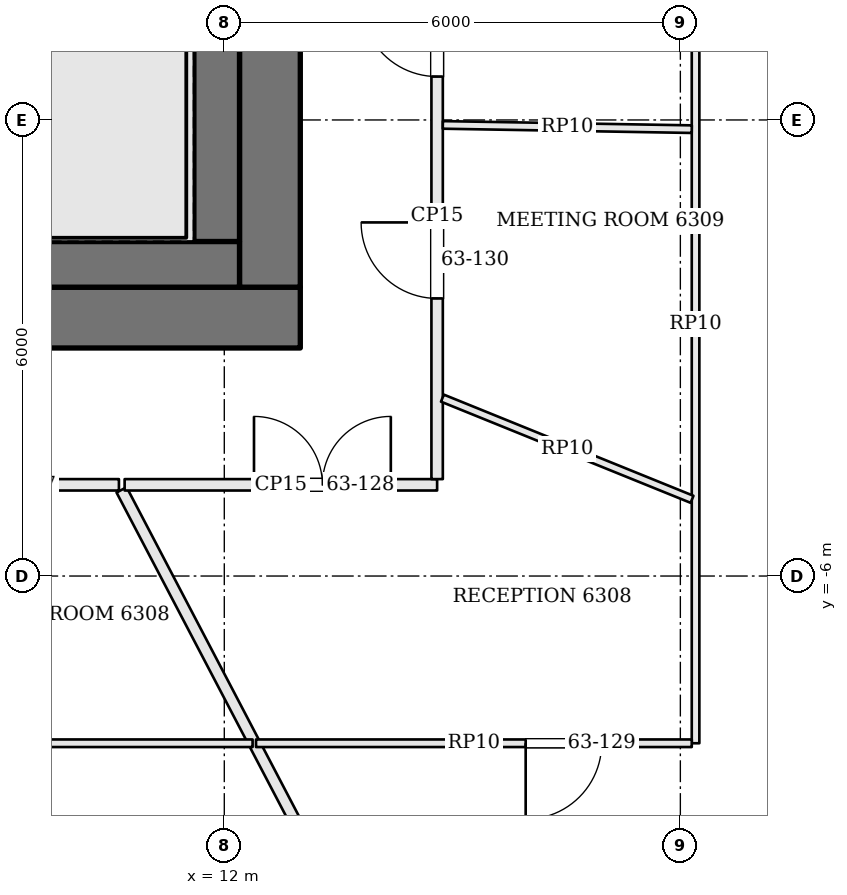
"""IFC4 building model, lengths in metres.
Left out: names, types, materials, properties, quantities, classifications, styles, units other than length and angle.
Written with IfcOpenShell. Run it as: python <this file> out.ifc"""

import sys

from ifc_helpers import new_model, si_unit, direction, frame, frame_2d, origin, place, context, subcontext, project, spatial, rectangle, extrude, element, fill, save


model = new_model("IFC4")
c1 = context("Model", 3, precision=1e-05, world=origin(), true_north=direction((0.0, 1.0)))
c2 = subcontext(c1, "Body", "Model", "MODEL_VIEW")
j1 = project(units=[si_unit("LENGTHUNIT", "METRE"), si_unit("PLANEANGLEUNIT", "RADIAN")], contexts=[c1])
p1 = place(None, origin())
s1 = spatial("IfcSite", under=j1, at=p1, CompositionType="ELEMENT")
p2 = place(p1, origin())
s2 = spatial("IfcBuilding", under=s1, at=p2, CompositionType="ELEMENT")
p3 = place(p2, frame((0.0, 0.0, 256.5)))
s3 = spatial("IfcBuildingStorey", under=s2, at=p3, CompositionType="ELEMENT", Elevation=256.5)
p4 = place(p3, frame((-13.0, -2.6, 0.0), z_axis=(0.0, 0.0, 1.0), x_axis=(1.0, 0.0, 0.0)))
e1 = element("IfcWall", 1, at=p4, inside=s3, PredefinedType="SHEAR", context=c2, shape_type="SweptSolid", body=[
    extrude(rectangle(XDim=26.0, YDim=0.8, at=frame_2d((13.0, 0.0))), origin(), (0.0, 0.0, 1.0), 3.9),
])
p5 = place(p4, frame((9.275, 0.0, 0.0)))
e2 = element("IfcOpeningElement", 2, at=p5, cuts=e1, PredefinedType="OPENING", context=c2, shape_type="SweptSolid", body=[
    extrude(rectangle(XDim=0.9, YDim=2.1, at=frame_2d((0.45, 1.05))), frame((0.0, 0.41, 0.0), z_axis=(0.0, -1.0, 0.0), x_axis=(1.0, 0.0, 0.0)), (0.0, 0.0, 1.0), 0.82),
])
p6 = place(p4, frame((11.75, 0.0, 0.0)))
e3 = element("IfcOpeningElement", 3, at=p6, cuts=e1, PredefinedType="OPENING", context=c2, shape_type="SweptSolid", body=[
    extrude(rectangle(XDim=1.0, YDim=2.1, at=frame_2d((0.5, 1.05))), frame((0.0, 0.41, 0.0), z_axis=(0.0, -1.0, 0.0), x_axis=(1.0, 0.0, 0.0)), (0.0, 0.0, 1.0), 0.82),
])
p7 = place(p4, frame((14.325, 0.0, 0.0)))
e4 = element("IfcOpeningElement", 4, at=p7, cuts=e1, PredefinedType="OPENING", context=c2, shape_type="SweptSolid", body=[
    extrude(rectangle(XDim=0.9, YDim=2.1, at=frame_2d((0.45, 1.05))), frame((0.0, 0.41, 0.0), z_axis=(0.0, -1.0, 0.0), x_axis=(1.0, 0.0, 0.0)), (0.0, 0.0, 1.0), 0.82),
])
p8 = place(p4, frame((16.7, 0.0, 0.0)))
e5 = element("IfcOpeningElement", 5, at=p8, cuts=e1, PredefinedType="OPENING", context=c2, shape_type="SweptSolid", body=[
    extrude(rectangle(XDim=0.9, YDim=2.1, at=frame_2d((0.45, 1.05))), frame((0.0, 0.41, 0.0), z_axis=(0.0, -1.0, 0.0), x_axis=(1.0, 0.0, 0.0)), (0.0, 0.0, 1.0), 0.82),
])
p9 = place(p3, frame((12.6, -2.2, 0.0), z_axis=(0.0, 0.0, 1.0), x_axis=(0.0, 1.0, 0.0)))
e6 = element("IfcWall", 6, at=p9, inside=s3, PredefinedType="SHEAR", context=c2, shape_type="SweptSolid", body=[
    extrude(rectangle(XDim=13.4, YDim=0.8, at=frame_2d((6.7, 0.0))), origin(), (0.0, 0.0, 1.0), 3.9),
])
p10 = place(p9, frame((7.4, 0.0, 0.0)))
e7 = element("IfcOpeningElement", 7, at=p10, cuts=e6, PredefinedType="OPENING", context=c2, shape_type="SweptSolid", body=[
    extrude(rectangle(XDim=1.8, YDim=2.1, at=frame_2d((0.9, 1.05))), frame((0.0, 0.41, 0.0), z_axis=(0.0, -1.0, 0.0), x_axis=(1.0, 0.0, 0.0)), (0.0, 0.0, 1.0), 0.82),
])
p11 = place(p3, frame((11.9, 1.35, 0.0), z_axis=(0.0, 0.0, 1.0), x_axis=(0.0, -1.0, 0.0)))
e8 = element("IfcWall", 8, at=p11, inside=s3, PredefinedType="SOLIDWALL", context=c2, shape_type="SweptSolid", body=[
    extrude(rectangle(XDim=2.95, YDim=0.6, at=frame_2d((1.475, 0.0))), origin(), (0.0, 0.0, 1.0), 3.7),
])
p12 = place(p3, frame((12.2, -1.9, 0.0), z_axis=(0.0, 0.0, 1.0), x_axis=(-1.0, 0.0, 0.0)))
e9 = element("IfcWall", 9, at=p12, inside=s3, PredefinedType="SOLIDWALL", context=c2, shape_type="SweptSolid", body=[
    extrude(rectangle(XDim=7.1, YDim=0.6, at=frame_2d((3.55, 0.0))), origin(), (0.0, 0.0, 1.0), 3.7),
])
p13 = place(p3, frame((2.413, -4.8, 0.0), z_axis=(0.0, 0.0, 1.0), x_axis=(1.0, 0.0, 0.0)))
e10 = element("IfcWall", 10, at=p13, inside=s3, PredefinedType="PARTITIONING", context=c2, shape_type="SweptSolid", body=[
    extrude(rectangle(XDim=8.2, YDim=0.15, at=frame_2d((4.1, 0.0))), origin(), (0.0, 0.0, 1.0), 3.084),
])
p14 = place(p13, frame((1.384, 0.0, 0.0)))
e11 = element("IfcOpeningElement", 11, at=p14, cuts=e10, PredefinedType="OPENING", context=c2, shape_type="SweptSolid", body=[
    extrude(rectangle(XDim=1.8, YDim=2.1, at=frame_2d((0.9, 1.05))), frame((0.0, 0.085, 0.0), z_axis=(0.0, -1.0, 0.0), x_axis=(1.0, 0.0, 0.0)), (0.0, 0.0, 1.0), 0.17),
])
p15 = place(p13, frame((5.922, 0.0, 0.0)))
e12 = element("IfcOpeningElement", 12, at=p15, cuts=e10, PredefinedType="OPENING", context=c2, shape_type="SweptSolid", body=[
    extrude(rectangle(XDim=1.0, YDim=2.4, at=frame_2d((0.5, 1.2))), frame((0.0, 0.085, 0.0), z_axis=(0.0, -1.0, 0.0), x_axis=(1.0, 0.0, 0.0)), (0.0, 0.0, 1.0), 0.17),
])
p16 = place(p3, frame((17.193, -17.36, 0.0), z_axis=(0.0, 0.0, 1.0), x_axis=(-0.464008288338, 0.885830857643, 0.0)))
e13 = element("IfcWall", 13, at=p16, inside=s3, PredefinedType="PARTITIONING", context=c2, shape_type="SweptSolid", body=[
    extrude(rectangle(XDim=14.104, YDim=0.15, at=frame_2d((7.052, 0.0))), origin(), (0.0, 0.0, 1.0), 3.084),
])
p17 = place(p3, frame((10.689, -4.8, 0.0), z_axis=(0.0, 0.0, 1.0), x_axis=(1.0, 0.0, 0.0)))
e14 = element("IfcWall", 14, at=p17, inside=s3, PredefinedType="PARTITIONING", context=c2, shape_type="SweptSolid", body=[
    extrude(rectangle(XDim=4.111, YDim=0.15, at=frame_2d((2.056, 0.0))), origin(), (0.0, 0.0, 1.0), 3.084),
])
p18 = place(p17, frame((1.702, 0.0, 0.0)))
e15 = element("IfcOpeningElement", 15, at=p18, cuts=e14, PredefinedType="OPENING", context=c2, shape_type="SweptSolid", body=[
    extrude(rectangle(XDim=1.8, YDim=2.1, at=frame_2d((0.9, 1.05))), frame((0.0, 0.085, 0.0), z_axis=(0.0, -1.0, 0.0), x_axis=(1.0, 0.0, 0.0)), (0.0, 0.0, 1.0), 0.17),
])
p19 = place(p3, frame((14.8, -4.725, 0.0), z_axis=(0.0, 0.0, 1.0), x_axis=(0.0, 1.0, 0.0)))
e16 = element("IfcWall", 16, at=p19, inside=s3, PredefinedType="PARTITIONING", context=c2, shape_type="SweptSolid", body=[
    extrude(rectangle(XDim=6.932, YDim=0.15, at=frame_2d((3.466, 0.0))), origin(), (0.0, 0.0, 1.0), 3.084),
])
p20 = place(p19, frame((2.377, 0.0, 0.0)))
e17 = element("IfcOpeningElement", 17, at=p20, cuts=e16, PredefinedType="OPENING", context=c2, shape_type="SweptSolid", body=[
    extrude(rectangle(XDim=1.0, YDim=2.4, at=frame_2d((0.5, 1.2))), frame((0.0, 0.085, 0.0), z_axis=(0.0, -1.0, 0.0), x_axis=(1.0, 0.0, 0.0)), (0.0, 0.0, 1.0), 0.17),
])
p21 = place(p19, frame((5.296, 0.0, 0.0)))
e18 = element("IfcOpeningElement", 18, at=p21, cuts=e16, PredefinedType="OPENING", context=c2, shape_type="SweptSolid", body=[
    extrude(rectangle(XDim=1.0, YDim=2.4, at=frame_2d((0.5, 1.2))), frame((0.0, 0.085, 0.0), z_axis=(0.0, -1.0, 0.0), x_axis=(1.0, 0.0, 0.0)), (0.0, 0.0, 1.0), 0.17),
])
p22 = place(p3, frame((12.372, -8.2, 0.0), z_axis=(0.0, 0.0, 1.0), x_axis=(-1.0, 0.0, 0.0)))
e19 = element("IfcWall", 19, at=p22, inside=s3, PredefinedType="PARTITIONING", context=c2, shape_type="SweptSolid", body=[
    extrude(rectangle(XDim=9.871, YDim=0.1, at=frame_2d((4.936, 0.0))), origin(), (0.0, 0.0, 1.0), 3.084),
])
p23 = place(p22, frame((6.604, 0.0, 0.0)))
e20 = element("IfcOpeningElement", 20, at=p23, cuts=e19, PredefinedType="OPENING", context=c2, shape_type="SweptSolid", body=[
    extrude(rectangle(XDim=1.0, YDim=2.1, at=frame_2d((0.5, 1.05))), frame((0.0, 0.06, 0.0), z_axis=(0.0, -1.0, 0.0), x_axis=(1.0, 0.0, 0.0)), (0.0, 0.0, 1.0), 0.12),
])
p24 = place(p3, frame((18.2, 2.821, 0.0), z_axis=(0.0, 0.0, 1.0), x_axis=(0.0, -1.0, 0.0)))
e21 = element("IfcWall", 21, at=p24, inside=s3, PredefinedType="PARTITIONING", context=c2, shape_type="SweptSolid", body=[
    extrude(rectangle(XDim=11.021, YDim=0.1, at=frame_2d((5.511, 0.0))), origin(), (0.0, 0.0, 1.0), 3.084),
])
p25 = place(p3, frame((18.15, -8.2, 0.0), z_axis=(0.0, 0.0, 1.0), x_axis=(-1.0, 0.0, 0.0)))
e22 = element("IfcWall", 22, at=p25, inside=s3, PredefinedType="PARTITIONING", context=c2, shape_type="SweptSolid", body=[
    extrude(rectangle(XDim=5.732, YDim=0.1, at=frame_2d((2.866, 0.0))), origin(), (0.0, 0.0, 1.0), 3.084),
])
p26 = place(p25, frame((1.185, 0.0, 0.0)))
e23 = element("IfcOpeningElement", 23, at=p26, cuts=e22, PredefinedType="OPENING", context=c2, shape_type="SweptSolid", body=[
    extrude(rectangle(XDim=1.0, YDim=2.1, at=frame_2d((0.5, 1.05))), frame((0.0, 0.06, 0.0), z_axis=(0.0, -1.0, 0.0), x_axis=(1.0, 0.0, 0.0)), (0.0, 0.0, 1.0), 0.12),
])
p27 = place(p3, frame((14.869, -3.66, 0.0), z_axis=(0.0, 0.0, 1.0), x_axis=(0.926809268232, -0.375532395832, 0.0)))
e24 = element("IfcWall", 24, at=p27, inside=s3, PredefinedType="PARTITIONING", context=c2, shape_type="SweptSolid", body=[
    extrude(rectangle(XDim=3.544, YDim=0.1, at=frame_2d((1.772, 0.0))), origin(), (0.0, 0.0, 1.0), 3.084),
])
p28 = place(p3, frame((14.875, -0.065, 0.0), z_axis=(0.0, 0.0, 1.0), x_axis=(0.999854310099, -0.017069228941, 0.0)))
e25 = element("IfcWall", 25, at=p28, inside=s3, PredefinedType="PARTITIONING", context=c2, shape_type="SweptSolid", body=[
    extrude(rectangle(XDim=3.275, YDim=0.1, at=frame_2d((1.638, 0.0))), origin(), (0.0, 0.0, 1.0), 3.084),
])
p29 = place(p18, origin())
e26 = element("IfcDoor", 26, at=p29, inside=s3, OperationType="DOUBLE_DOOR_SINGLE_SWING", PredefinedType="DOOR", context=c2, shape_type="SweptSolid", body=[
    extrude(rectangle(XDim=1.8, YDim=2.1, at=frame_2d((0.9, 1.05))), frame((0.0, 0.025, 0.0), z_axis=(0.0, -1.0, 0.0), x_axis=(1.0, 0.0, 0.0)), (0.0, 0.0, 1.0), 0.05),
])
fill(e15, e26)
p30 = place(p26, origin())
e27 = element("IfcDoor", 27, at=p30, inside=s3, OperationType="SINGLE_SWING_RIGHT", PredefinedType="DOOR", context=c2, shape_type="SweptSolid", body=[
    extrude(rectangle(XDim=1.0, YDim=2.1, at=frame_2d((0.5, 1.05))), frame((0.0, 0.025, 0.0), z_axis=(0.0, -1.0, 0.0), x_axis=(1.0, 0.0, 0.0)), (0.0, 0.0, 1.0), 0.05),
])
fill(e23, e27)
p31 = place(p20, origin())
e28 = element("IfcDoor", 28, at=p31, inside=s3, OperationType="SINGLE_SWING_RIGHT", PredefinedType="DOOR", context=c2, shape_type="SweptSolid", body=[
    extrude(rectangle(XDim=1.0, YDim=2.4, at=frame_2d((0.5, 1.2))), frame((0.0, 0.025, 0.0), z_axis=(0.0, -1.0, 0.0), x_axis=(1.0, 0.0, 0.0)), (0.0, 0.0, 1.0), 0.05),
])
fill(e17, e28)
p32 = place(p21, origin())
e29 = element("IfcDoor", 29, at=p32, inside=s3, OperationType="SINGLE_SWING_RIGHT", PredefinedType="DOOR", context=c2, shape_type="SweptSolid", body=[
    extrude(rectangle(XDim=1.0, YDim=2.4, at=frame_2d((0.5, 1.2))), frame((0.0, 0.025, 0.0), z_axis=(0.0, -1.0, 0.0), x_axis=(1.0, 0.0, 0.0)), (0.0, 0.0, 1.0), 0.05),
])
fill(e18, e29)
save(model, sys.argv[1])
